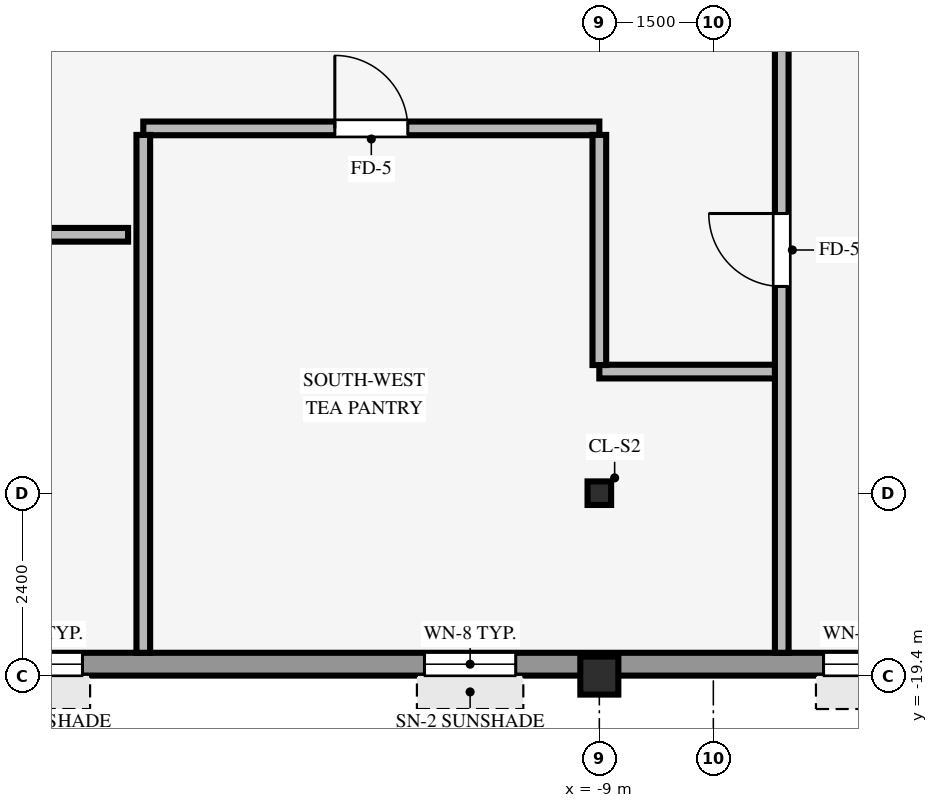
"""IFC4 building model, lengths in metres.
Left out: names, types, materials, properties, quantities, classifications, styles, units other than length and angle.
Written with IfcOpenShell. Run it as: python <this file> out.ifc"""

import sys

from ifc_helpers import new_model, si_unit, direction, frame, frame_2d, origin, origin_2d, place, context, subcontext, project, spatial, rectangle, hollow_rectangle, i_section, extrude, source, transform, mapped, element, fill, save


model = new_model("IFC4")
c1 = context("Model", 3, precision=1e-05, world=origin(), true_north=direction((0.0, 1.0)))
c2 = subcontext(c1, "Body", "Model", "MODEL_VIEW")
j1 = project(units=[si_unit("LENGTHUNIT", "METRE"), si_unit("PLANEANGLEUNIT", "RADIAN")], contexts=[c1])
p1 = place(None, origin())
s1 = spatial("IfcSite", under=j1, at=p1, CompositionType="ELEMENT")
p2 = place(p1, origin())
s2 = spatial("IfcBuilding", under=s1, at=p2, CompositionType="ELEMENT")
p3 = place(p2, frame((0.0, 0.0, 272.55)))
s3 = spatial("IfcBuildingStorey", under=s2, at=p3, CompositionType="ELEMENT", Elevation=272.55)
p4 = place(p3, frame((-9.0, -19.4, 0.0), z_axis=(0.0, 0.0, 1.0), x_axis=(1.0, 0.0, 0.0)))
e1 = element("IfcColumn", 1, at=p4, inside=s3, PredefinedType="COLUMN", context=c2, shape_type="SweptSolid", body=[
    extrude(hollow_rectangle(XDim=0.5, YDim=0.5, WallThickness=0.032, InnerFilletRadius=0.032, OuterFilletRadius=0.064, at=origin_2d()), origin(), (0.0, 0.0, 1.0), 3.37),
])
p5 = place(p3, frame((-9.0, -17.0, 0.0), z_axis=(0.0, 0.0, 1.0), x_axis=(1.0, 0.0, 0.0)))
e2 = element("IfcColumn", 2, at=p5, inside=s3, PredefinedType="COLUMN", context=c2, shape_type="SweptSolid", body=[
    extrude(i_section(OverallWidth=0.31, OverallDepth=0.31, WebThickness=0.015, FlangeThickness=0.015, FilletRadius=0.015, at=origin_2d()), origin(), (0.0, 0.0, 1.0), 3.37),
])
p6 = place(p3, frame((-18.9, -19.25, 0.0), z_axis=(0.0, 0.0, 1.0), x_axis=(1.0, 0.0, 0.0)))
e3 = element("IfcWall", 3, at=p6, inside=s3, PredefinedType="STANDARD", context=c2, shape_type="SweptSolid", body=[
    extrude(rectangle(XDim=35.6, YDim=0.3, at=frame_2d((17.8, 0.0))), origin(), (0.0, 0.0, 1.0), 2.705),
])
p7 = place(p6, frame((1.9, 0.0, 0.8)))
e4 = element("IfcOpeningElement", 4, at=p7, cuts=e3, PredefinedType="OPENING", context=c2, shape_type="SweptSolid", body=[
    extrude(rectangle(XDim=1.2, YDim=1.48, at=frame_2d((0.6, 0.74))), frame((0.0, 0.16, 0.0), z_axis=(0.0, -1.0, 0.0), x_axis=(1.0, 0.0, 0.0)), (0.0, 0.0, 1.0), 0.32),
])
p8 = place(p6, frame((7.6, 0.0, 0.8)))
e5 = element("IfcOpeningElement", 5, at=p8, cuts=e3, PredefinedType="OPENING", context=c2, shape_type="SweptSolid", body=[
    extrude(rectangle(XDim=1.2, YDim=1.48, at=frame_2d((0.6, 0.74))), frame((0.0, 0.16, 0.0), z_axis=(0.0, -1.0, 0.0), x_axis=(1.0, 0.0, 0.0)), (0.0, 0.0, 1.0), 0.32),
])
p9 = place(p6, frame((12.85, 0.0, 0.8)))
e6 = element("IfcOpeningElement", 6, at=p9, cuts=e3, PredefinedType="OPENING", context=c2, shape_type="SweptSolid", body=[
    extrude(rectangle(XDim=1.2, YDim=1.48, at=frame_2d((0.6, 0.74))), frame((0.0, 0.16, 0.0), z_axis=(0.0, -1.0, 0.0), x_axis=(1.0, 0.0, 0.0)), (0.0, 0.0, 1.0), 0.32),
])
p10 = place(p6, frame((22.0, 0.0, 0.8)))
e7 = element("IfcOpeningElement", 7, at=p10, cuts=e3, PredefinedType="OPENING", context=c2, shape_type="SweptSolid", body=[
    extrude(rectangle(XDim=1.2, YDim=1.48, at=frame_2d((0.6, 0.74))), frame((0.0, 0.16, 0.0), z_axis=(0.0, -1.0, 0.0), x_axis=(1.0, 0.0, 0.0)), (0.0, 0.0, 1.0), 0.32),
])
p11 = place(p6, frame((25.9, 0.0, 0.8)))
e8 = element("IfcOpeningElement", 8, at=p11, cuts=e3, PredefinedType="OPENING", context=c2, shape_type="SweptSolid", body=[
    extrude(rectangle(XDim=1.2, YDim=1.48, at=frame_2d((0.6, 0.74))), frame((0.0, 0.16, 0.0), z_axis=(0.0, -1.0, 0.0), x_axis=(1.0, 0.0, 0.0)), (0.0, 0.0, 1.0), 0.32),
])
p12 = place(p6, frame((31.6, 0.0, 0.8)))
e9 = element("IfcOpeningElement", 9, at=p12, cuts=e3, PredefinedType="OPENING", context=c2, shape_type="SweptSolid", body=[
    extrude(rectangle(XDim=1.2, YDim=1.48, at=frame_2d((0.6, 0.74))), frame((0.0, 0.16, 0.0), z_axis=(0.0, -1.0, 0.0), x_axis=(1.0, 0.0, 0.0)), (0.0, 0.0, 1.0), 0.32),
])
p13 = place(p3, frame((-9.0, -15.4, 0.0), z_axis=(0.0, 0.0, 1.0), x_axis=(1.0, 0.0, 0.0)))
e10 = element("IfcWall", 10, at=p13, inside=s3, PredefinedType="PARTITIONING", context=c2, shape_type="SweptSolid", body=[
    extrude(rectangle(XDim=2.334, YDim=0.18, at=frame_2d((1.167, 0.0))), origin(), (0.0, 0.0, 1.0), 3.36),
])
p14 = place(p3, frame((-20.0, -13.6, 0.0), z_axis=(0.0, 0.0, 1.0), x_axis=(1.0, 0.0, 0.0)))
e11 = element("IfcWall", 11, at=p14, inside=s3, PredefinedType="PARTITIONING", context=c2, shape_type="SweptSolid", body=[
    extrude(rectangle(XDim=4.8, YDim=0.18, at=frame_2d((2.4, 0.0))), origin(), (0.0, 0.0, 1.0), 3.038),
])
p15 = place(p14, frame((1.92, 0.0, 0.0)))
e12 = element("IfcOpeningElement", 12, at=p15, cuts=e11, PredefinedType="OPENING", context=c2, shape_type="SweptSolid", body=[
    extrude(rectangle(XDim=0.96, YDim=2.1, at=frame_2d((0.48, 1.05))), frame((0.0, 0.1, 0.0), z_axis=(0.0, -1.0, 0.0), x_axis=(1.0, 0.0, 0.0)), (0.0, 0.0, 1.0), 0.2),
])
p16 = place(p3, frame((-15.0, -12.2, 0.0), z_axis=(0.0, 0.0, 1.0), x_axis=(1.0, 0.0, 0.0)))
e13 = element("IfcWall", 13, at=p16, inside=s3, PredefinedType="PARTITIONING", context=c2, shape_type="SweptSolid", body=[
    extrude(rectangle(XDim=6.0, YDim=0.18, at=frame_2d((3.0, 0.0))), origin(), (0.0, 0.0, 1.0), 3.36),
])
p17 = place(p16, frame((2.52, 0.0, 0.0)))
e14 = element("IfcOpeningElement", 14, at=p17, cuts=e13, PredefinedType="OPENING", context=c2, shape_type="SweptSolid", body=[
    extrude(rectangle(XDim=0.96, YDim=2.1, at=frame_2d((0.48, 1.05))), frame((0.0, 0.1, 0.0), z_axis=(0.0, -1.0, 0.0), x_axis=(1.0, 0.0, 0.0)), (0.0, 0.0, 1.0), 0.2),
])
p18 = place(p3, frame((-15.0, -19.1, 0.0), z_axis=(0.0, 0.0, 1.0), x_axis=(0.0, 1.0, 0.0)))
e15 = element("IfcWall", 15, at=p18, inside=s3, PredefinedType="PARTITIONING", context=c2, shape_type="SweptSolid", body=[
    extrude(rectangle(XDim=6.814, YDim=0.18, at=frame_2d((3.407, 0.0))), origin(), (0.0, 0.0, 1.0), 3.36),
])
p19 = place(p3, frame((-9.0, -15.314, 0.0), z_axis=(0.0, 0.0, 1.0), x_axis=(0.0, 1.0, 0.0)))
e16 = element("IfcWall", 16, at=p19, inside=s3, PredefinedType="PARTITIONING", context=c2, shape_type="SweptSolid", body=[
    extrude(rectangle(XDim=3.028, YDim=0.18, at=frame_2d((1.514, 0.0))), origin(), (0.0, 0.0, 1.0), 2.892),
])
p20 = place(p3, frame((-6.6, -19.1, 0.0), z_axis=(0.0, 0.0, 1.0), x_axis=(0.0, 1.0, 0.0)))
e17 = element("IfcWall", 17, at=p20, inside=s3, PredefinedType="PARTITIONING", context=c2, shape_type="SweptSolid", body=[
    extrude(rectangle(XDim=17.764, YDim=0.18, at=frame_2d((8.882, 0.0))), origin(), (0.0, 0.0, 1.0), 3.36),
])
p21 = place(p20, frame((4.82, 0.0, 0.0)))
e18 = element("IfcOpeningElement", 18, at=p21, cuts=e17, PredefinedType="OPENING", context=c2, shape_type="SweptSolid", body=[
    extrude(rectangle(XDim=0.96, YDim=2.1, at=frame_2d((0.48, 1.05))), frame((0.0, 0.1, 0.0), z_axis=(0.0, -1.0, 0.0), x_axis=(1.0, 0.0, 0.0)), (0.0, 0.0, 1.0), 0.2),
])
m1 = source(origin(), c2, "Body", "SweptSolid", [
    extrude(rectangle(XDim=1.2, YDim=1.48, at=frame_2d((0.6, 0.74))), frame((0.0, 0.03, 0.0), z_axis=(0.0, -1.0, 0.0), x_axis=(1.0, 0.0, 0.0)), (0.0, 0.0, 1.0), 0.06),
])
p22 = place(p7, origin())
e19 = element("IfcWindow", 19, at=p22, inside=s3, PartitioningType="SINGLE_PANEL", PredefinedType="WINDOW", context=c2, shape_type="MappedRepresentation", body=[
    mapped(m1, transform((0.0, 0.0, 0.0), scale=1.0)),
])
fill(e4, e19)
p23 = place(p8, origin())
e20 = element("IfcWindow", 20, at=p23, inside=s3, PartitioningType="SINGLE_PANEL", PredefinedType="WINDOW", context=c2, shape_type="MappedRepresentation", body=[
    mapped(m1, transform((0.0, 0.0, 0.0), scale=1.0)),
])
fill(e5, e20)
p24 = place(p9, origin())
e21 = element("IfcWindow", 21, at=p24, inside=s3, PartitioningType="SINGLE_PANEL", PredefinedType="WINDOW", context=c2, shape_type="MappedRepresentation", body=[
    mapped(m1, transform((0.0, 0.0, 0.0), scale=1.0)),
])
fill(e6, e21)
m2 = source(origin(), c2, "Body", "SweptSolid", [
    extrude(rectangle(XDim=0.96, YDim=2.1, at=frame_2d((0.48, 1.05))), frame((0.0, 0.025, 0.0), z_axis=(0.0, -1.0, 0.0), x_axis=(1.0, 0.0, 0.0)), (0.0, 0.0, 1.0), 0.05),
])
p25 = place(p17, origin())
e22 = element("IfcDoor", 22, at=p25, inside=s3, OperationType="SINGLE_SWING_LEFT", PredefinedType="DOOR", context=c2, shape_type="MappedRepresentation", body=[
    mapped(m2, transform((0.0, 0.0, 0.0), scale=1.0)),
])
fill(e14, e22)
p26 = place(p21, origin())
e23 = element("IfcDoor", 23, at=p26, inside=s3, OperationType="SINGLE_SWING_RIGHT", PredefinedType="DOOR", context=c2, shape_type="MappedRepresentation", body=[
    mapped(m2, transform((0.0, 0.0, 0.0), scale=1.0)),
])
fill(e18, e23)
save(model, sys.argv[1])
